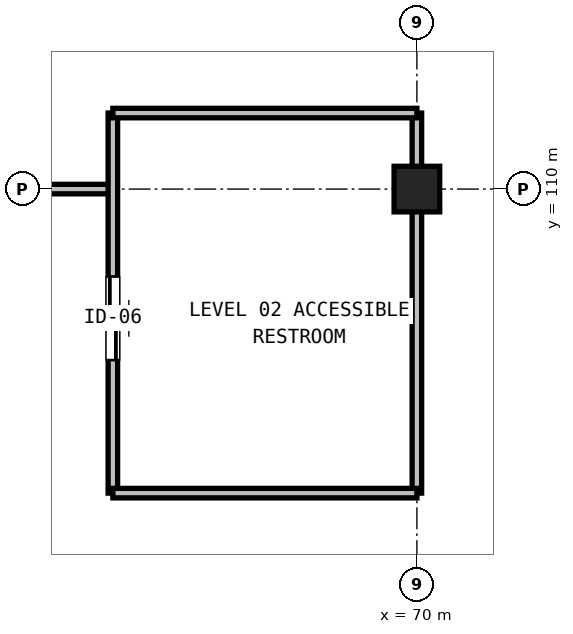
"""IFC4 building model, lengths in metres.
Left out: names, types, materials, properties, quantities, classifications, styles, units other than length and angle.
Written with IfcOpenShell. Run it as: python <this file> out.ifc"""

import sys

from ifc_helpers import new_model, si_unit, direction, frame, frame_2d, origin, origin_2d, place, context, subcontext, project, spatial, rectangle, extrude, element, fill, save


model = new_model("IFC4")
c1 = context("Model", 3, precision=1e-05, world=origin(), true_north=direction((0.0, 1.0)))
c2 = subcontext(c1, "Body", "Model", "MODEL_VIEW")
j1 = project(units=[si_unit("LENGTHUNIT", "METRE"), si_unit("PLANEANGLEUNIT", "RADIAN")], contexts=[c1])
p1 = place(None, origin())
s1 = spatial("IfcSite", under=j1, at=p1, CompositionType="ELEMENT")
p2 = place(p1, origin())
s2 = spatial("IfcBuilding", under=s1, at=p2, CompositionType="ELEMENT")
p3 = place(p2, frame((0.0, 0.0, 10.8)))
s3 = spatial("IfcBuildingStorey", under=s2, at=p3, CompositionType="ELEMENT", Elevation=10.8)
p4 = place(p3, frame((70.0, 110.0, 0.0), z_axis=(0.0, 0.0, 1.0), x_axis=(1.0, 0.0, 0.0)))
e1 = element("IfcColumn", 1, at=p4, inside=s3, PredefinedType="COLUMN", context=c2, shape_type="SweptSolid", body=[
    extrude(rectangle(XDim=0.6, YDim=0.6, at=origin_2d()), origin(), (0.0, 0.0, 1.0), 4.2),
])
p5 = place(p3, frame((54.3, 110.0, 0.0), z_axis=(0.0, 0.0, 1.0), x_axis=(1.0, 0.0, 0.0)))
e2 = element("IfcWall", 2, at=p5, inside=s3, PredefinedType="PARTITIONING", context=c2, shape_type="SweptSolid", body=[
    extrude(rectangle(XDim=11.7, YDim=0.125, at=frame_2d((5.85, 0.0))), origin(), (0.0, 0.0, 1.0), 3.31),
])
p6 = place(p3, frame((66.0, 106.0, 0.0), z_axis=(0.0, 0.0, 1.0), x_axis=(0.0, 1.0, 0.0)))
e3 = element("IfcWall", 3, at=p6, inside=s3, PredefinedType="PARTITIONING", context=c2, shape_type="SweptSolid", body=[
    extrude(rectangle(XDim=5.0, YDim=0.125, at=frame_2d((2.5, 0.0))), origin(), (0.0, 0.0, 1.0), 3.9),
])
p7 = place(p6, frame((1.75, 0.0, 0.0)))
e4 = element("IfcOpeningElement", 4, at=p7, cuts=e3, PredefinedType="OPENING", context=c2, shape_type="SweptSolid", body=[
    extrude(rectangle(XDim=1.1, YDim=2.15, at=frame_2d((0.55, 1.075))), frame((0.0, 0.073, 0.0), z_axis=(0.0, -1.0, 0.0), x_axis=(1.0, 0.0, 0.0)), (0.0, 0.0, 1.0), 0.145),
])
p8 = place(p3, frame((70.0, 106.0, 0.0), z_axis=(0.0, 0.0, 1.0), x_axis=(0.0, 1.0, 0.0)))
e5 = element("IfcWall", 5, at=p8, inside=s3, PredefinedType="PARTITIONING", context=c2, shape_type="SweptSolid", body=[
    extrude(rectangle(XDim=5.0, YDim=0.125, at=frame_2d((2.5, 0.0))), origin(), (0.0, 0.0, 1.0), 3.36),
])
for number, where, z_axis, x_axis in (
    (6, (66.0, 111.0, 0.0), (0.0, 0.0, 1.0), (1.0, 0.0, 0.0)),
    (7, (66.0, 106.0, 0.0), (0.0, 0.0, 1.0), (1.0, 0.0, 0.0)),
):
    element("IfcWall", number, at=place(p3, frame(where, z_axis=z_axis, x_axis=x_axis)), inside=s3, PredefinedType="PARTITIONING", context=c2, shape_type="SweptSolid", body=[
        extrude(rectangle(XDim=4.0, YDim=0.125, at=frame_2d((2.0, 0.0))), origin(), (0.0, 0.0, 1.0), 3.9),
    ])
p9 = place(p7, frame((1.1, 0.0, 0.0), z_axis=(0.0, 0.0, 1.0), x_axis=(-1.0, 0.0, 0.0)))
e8 = element("IfcDoor", 8, at=p9, inside=s3, OperationType="SLIDING_TO_RIGHT", PredefinedType="DOOR", context=c2, shape_type="SweptSolid", body=[
    extrude(rectangle(XDim=1.1, YDim=2.15, at=frame_2d((0.55, 1.075))), frame((0.0, 0.025, 0.0), z_axis=(0.0, -1.0, 0.0), x_axis=(1.0, 0.0, 0.0)), (0.0, 0.0, 1.0), 0.05),
])
fill(e4, e8)
save(model, sys.argv[1])
